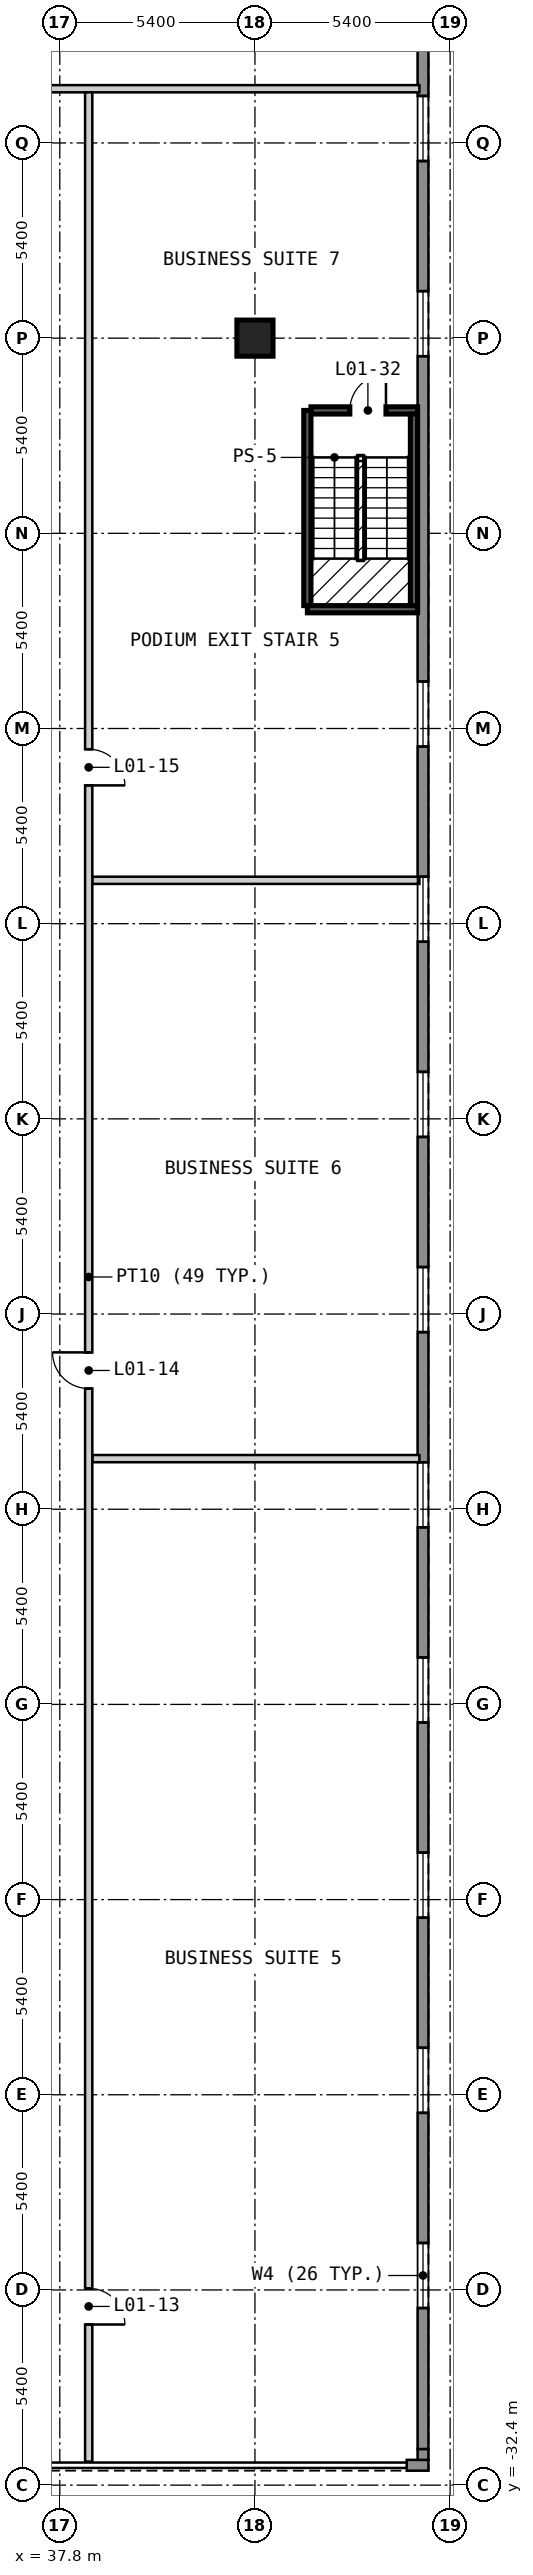
"""IFC4 building model, lengths in metres.
Left out: names, types, materials, properties, quantities, classifications, styles, units other than length and angle.
Written with IfcOpenShell. Run it as: python <this file> out.ifc"""

import sys

from ifc_helpers import new_model, si_unit, direction, frame, frame_2d, origin, origin_2d, place, context, subcontext, project, spatial, rectangle, extrude, element, fill, save


model = new_model("IFC4")
c1 = context("Model", 3, precision=1e-05, world=origin(), true_north=direction((0.0, 1.0)))
c2 = subcontext(c1, "Body", "Model", "MODEL_VIEW")
j1 = project(units=[si_unit("LENGTHUNIT", "METRE"), si_unit("PLANEANGLEUNIT", "RADIAN")], contexts=[c1])
p1 = place(None, origin())
s1 = spatial("IfcSite", under=j1, at=p1, CompositionType="ELEMENT")
p2 = place(p1, origin())
s2 = spatial("IfcBuilding", under=s1, at=p2, CompositionType="ELEMENT")
p3 = place(p2, frame((0.0, 0.0, 5.0)))
s3 = spatial("IfcBuildingStorey", under=s2, at=p3, CompositionType="ELEMENT", Elevation=5.0)
p4 = place(p3, frame((43.2, 27.0, 0.0), z_axis=(0.0, 0.0, 1.0), x_axis=(1.0, 0.0, 0.0)))
e1 = element("IfcColumn", 1, at=p4, inside=s3, PredefinedType="COLUMN", context=c2, shape_type="SweptSolid", body=[
    extrude(rectangle(XDim=1.0, YDim=1.0, at=origin_2d()), origin(), (0.0, 0.0, 1.0), 4.0),
])
p5 = place(p3, frame((47.4, -31.85, 0.0), z_axis=(0.0, 0.0, 1.0), x_axis=(1.0, 0.0, 0.0)))
e2 = element("IfcWall", 2, at=p5, inside=s3, PredefinedType="SOLIDWALL", context=c2, shape_type="SweptSolid", body=[
    extrude(rectangle(XDim=0.6, YDim=0.3, at=frame_2d((0.3, 0.0))), origin(), (0.0, 0.0, 1.0), 3.5),
])
p6 = place(p3, frame((47.85, -31.7, 0.0), z_axis=(0.0, 0.0, 1.0), x_axis=(0.0, 1.0, 0.0)))
e3 = element("IfcWall", 3, at=p6, inside=s3, PredefinedType="SOLIDWALL", context=c2, shape_type="SweptSolid", body=[
    extrude(rectangle(XDim=0.3, YDim=0.3, at=frame_2d((0.15, 0.0))), origin(), (0.0, 0.0, 1.0), 3.5),
])
p7 = place(p3, frame((47.85, -31.4, 0.0), z_axis=(0.0, 0.0, 1.0), x_axis=(0.0, 1.0, 0.0)))
e4 = element("IfcWall", 4, at=p7, inside=s3, PredefinedType="SOLIDWALL", context=c2, shape_type="SweptSolid", body=[
    extrude(rectangle(XDim=70.8, YDim=0.3, at=frame_2d((35.4, 0.0))), origin(), (0.0, 0.0, 1.0), 3.5),
])
p8 = place(p7, frame((3.9, 0.0, 0.9)))
e5 = element("IfcOpeningElement", 5, at=p8, cuts=e4, PredefinedType="OPENING", context=c2, shape_type="SweptSolid", body=[
    extrude(rectangle(XDim=1.8, YDim=2.4, at=frame_2d((0.9, 1.2))), frame((0.0, 0.16, 0.0), z_axis=(0.0, -1.0, 0.0), x_axis=(1.0, 0.0, 0.0)), (0.0, 0.0, 1.0), 0.32),
])
p9 = place(p7, frame((9.3, 0.0, 0.9)))
e6 = element("IfcOpeningElement", 6, at=p9, cuts=e4, PredefinedType="OPENING", context=c2, shape_type="SweptSolid", body=[
    extrude(rectangle(XDim=1.8, YDim=2.4, at=frame_2d((0.9, 1.2))), frame((0.0, 0.16, 0.0), z_axis=(0.0, -1.0, 0.0), x_axis=(1.0, 0.0, 0.0)), (0.0, 0.0, 1.0), 0.32),
])
p10 = place(p7, frame((14.7, 0.0, 0.9)))
e7 = element("IfcOpeningElement", 7, at=p10, cuts=e4, PredefinedType="OPENING", context=c2, shape_type="SweptSolid", body=[
    extrude(rectangle(XDim=1.8, YDim=2.4, at=frame_2d((0.9, 1.2))), frame((0.0, 0.16, 0.0), z_axis=(0.0, -1.0, 0.0), x_axis=(1.0, 0.0, 0.0)), (0.0, 0.0, 1.0), 0.32),
])
p11 = place(p7, frame((20.1, 0.0, 0.9)))
e8 = element("IfcOpeningElement", 8, at=p11, cuts=e4, PredefinedType="OPENING", context=c2, shape_type="SweptSolid", body=[
    extrude(rectangle(XDim=1.8, YDim=2.4, at=frame_2d((0.9, 1.2))), frame((0.0, 0.16, 0.0), z_axis=(0.0, -1.0, 0.0), x_axis=(1.0, 0.0, 0.0)), (0.0, 0.0, 1.0), 0.32),
])
p12 = place(p7, frame((25.5, 0.0, 0.9)))
e9 = element("IfcOpeningElement", 9, at=p12, cuts=e4, PredefinedType="OPENING", context=c2, shape_type="SweptSolid", body=[
    extrude(rectangle(XDim=1.8, YDim=2.4, at=frame_2d((0.9, 1.2))), frame((0.0, 0.16, 0.0), z_axis=(0.0, -1.0, 0.0), x_axis=(1.0, 0.0, 0.0)), (0.0, 0.0, 1.0), 0.32),
])
p13 = place(p7, frame((30.9, 0.0, 0.9)))
e10 = element("IfcOpeningElement", 10, at=p13, cuts=e4, PredefinedType="OPENING", context=c2, shape_type="SweptSolid", body=[
    extrude(rectangle(XDim=1.8, YDim=2.4, at=frame_2d((0.9, 1.2))), frame((0.0, 0.16, 0.0), z_axis=(0.0, -1.0, 0.0), x_axis=(1.0, 0.0, 0.0)), (0.0, 0.0, 1.0), 0.32),
])
p14 = place(p7, frame((36.3, 0.0, 0.9)))
e11 = element("IfcOpeningElement", 11, at=p14, cuts=e4, PredefinedType="OPENING", context=c2, shape_type="SweptSolid", body=[
    extrude(rectangle(XDim=1.8, YDim=2.4, at=frame_2d((0.9, 1.2))), frame((0.0, 0.16, 0.0), z_axis=(0.0, -1.0, 0.0), x_axis=(1.0, 0.0, 0.0)), (0.0, 0.0, 1.0), 0.32),
])
p15 = place(p7, frame((41.7, 0.0, 0.9)))
e12 = element("IfcOpeningElement", 12, at=p15, cuts=e4, PredefinedType="OPENING", context=c2, shape_type="SweptSolid", body=[
    extrude(rectangle(XDim=1.8, YDim=2.4, at=frame_2d((0.9, 1.2))), frame((0.0, 0.16, 0.0), z_axis=(0.0, -1.0, 0.0), x_axis=(1.0, 0.0, 0.0)), (0.0, 0.0, 1.0), 0.32),
])
p16 = place(p7, frame((47.1, 0.0, 0.9)))
e13 = element("IfcOpeningElement", 13, at=p16, cuts=e4, PredefinedType="OPENING", context=c2, shape_type="SweptSolid", body=[
    extrude(rectangle(XDim=1.8, YDim=2.4, at=frame_2d((0.9, 1.2))), frame((0.0, 0.16, 0.0), z_axis=(0.0, -1.0, 0.0), x_axis=(1.0, 0.0, 0.0)), (0.0, 0.0, 1.0), 0.32),
])
p17 = place(p7, frame((57.9, 0.0, 0.9)))
e14 = element("IfcOpeningElement", 14, at=p17, cuts=e4, PredefinedType="OPENING", context=c2, shape_type="SweptSolid", body=[
    extrude(rectangle(XDim=1.8, YDim=2.4, at=frame_2d((0.9, 1.2))), frame((0.0, 0.16, 0.0), z_axis=(0.0, -1.0, 0.0), x_axis=(1.0, 0.0, 0.0)), (0.0, 0.0, 1.0), 0.32),
])
p18 = place(p7, frame((63.3, 0.0, 0.9)))
e15 = element("IfcOpeningElement", 15, at=p18, cuts=e4, PredefinedType="OPENING", context=c2, shape_type="SweptSolid", body=[
    extrude(rectangle(XDim=1.8, YDim=2.4, at=frame_2d((0.9, 1.2))), frame((0.0, 0.16, 0.0), z_axis=(0.0, -1.0, 0.0), x_axis=(1.0, 0.0, 0.0)), (0.0, 0.0, 1.0), 0.32),
])
for number, where, z_axis, x_axis in (
    (16, (38.7, -4.0, 0.0), (0.0, 0.0, 1.0), (1.0, 0.0, 0.0)),
    (17, (38.7, 12.0, 0.0), (0.0, 0.0, 1.0), (1.0, 0.0, 0.0)),
):
    element("IfcWall", number, at=place(p3, frame(where, z_axis=z_axis, x_axis=x_axis)), inside=s3, PredefinedType="PARTITIONING", context=c2, shape_type="SweptSolid", body=[
        extrude(rectangle(XDim=9.05, YDim=0.2, at=frame_2d((4.525, 0.0))), origin(), (0.0, 0.0, 1.0), 3.5),
    ])
p19 = place(p3, frame((44.65, 19.5, 0.0), z_axis=(0.0, 0.0, 1.0), x_axis=(1.0, 0.0, 0.0)))
e18 = element("IfcWall", 18, at=p19, inside=s3, PredefinedType="SOLIDWALL", context=c2, shape_type="SweptSolid", body=[
    extrude(rectangle(XDim=3.05, YDim=0.2, at=frame_2d((1.525, 0.0))), origin(), (0.0, 0.0, 1.0), 3.5),
])
p20 = place(p3, frame((44.75, 25.0, 0.0), z_axis=(0.0, 0.0, 1.0), x_axis=(1.0, 0.0, 0.0)))
e19 = element("IfcWall", 19, at=p20, inside=s3, PredefinedType="SOLIDWALL", context=c2, shape_type="SweptSolid", body=[
    extrude(rectangle(XDim=2.95, YDim=0.2, at=frame_2d((1.475, 0.0))), origin(), (0.0, 0.0, 1.0), 3.5),
])
p21 = place(p20, frame((2.075, 0.0, 0.0), z_axis=(0.0, 0.0, 1.0), x_axis=(-1.0, 0.0, 0.0)))
e20 = element("IfcOpeningElement", 20, at=p21, cuts=e19, PredefinedType="OPENING", context=c2, shape_type="SweptSolid", body=[
    extrude(rectangle(XDim=1.0, YDim=2.1, at=frame_2d((0.5, 1.05))), frame((0.0, 0.11, 0.0), z_axis=(0.0, -1.0, 0.0), x_axis=(1.0, 0.0, 0.0)), (0.0, 0.0, 1.0), 0.22),
])
p22 = place(p3, frame((21.2, 33.9, 0.0), z_axis=(0.0, 0.0, 1.0), x_axis=(1.0, 0.0, 0.0)))
e21 = element("IfcWall", 21, at=p22, inside=s3, PredefinedType="PARTITIONING", context=c2, shape_type="SweptSolid", body=[
    extrude(rectangle(XDim=26.55, YDim=0.2, at=frame_2d((13.275, 0.0))), origin(), (0.0, 0.0, 1.0), 3.5),
])
p23 = place(p22, frame((8.419, 0.0, 0.0)))
e22 = element("IfcOpeningElement", 22, at=p23, cuts=e21, PredefinedType="OPENING", context=c2, shape_type="SweptSolid", body=[
    extrude(rectangle(XDim=1.0, YDim=2.1, at=frame_2d((0.5, 1.05))), frame((0.0, 0.11, 0.0), z_axis=(0.0, -1.0, 0.0), x_axis=(1.0, 0.0, 0.0)), (0.0, 0.0, 1.0), 0.22),
])
p24 = place(p3, frame((38.6, -31.75, 0.0), z_axis=(0.0, 0.0, 1.0), x_axis=(0.0, 1.0, 0.0)))
e23 = element("IfcWall", 23, at=p24, inside=s3, PredefinedType="PARTITIONING", context=c2, shape_type="SweptSolid", body=[
    extrude(rectangle(XDim=65.55, YDim=0.2, at=frame_2d((32.775, 0.0))), origin(), (0.0, 0.0, 1.0), 3.5),
])
p25 = place(p24, frame((4.794, 0.0, 0.0), z_axis=(0.0, 0.0, 1.0), x_axis=(-1.0, 0.0, 0.0)))
e24 = element("IfcOpeningElement", 24, at=p25, cuts=e23, PredefinedType="OPENING", context=c2, shape_type="SweptSolid", body=[
    extrude(rectangle(XDim=1.0, YDim=2.1, at=frame_2d((0.5, 1.05))), frame((0.0, 0.11, 0.0), z_axis=(0.0, -1.0, 0.0), x_axis=(1.0, 0.0, 0.0)), (0.0, 0.0, 1.0), 0.22),
])
p26 = place(p24, frame((30.689, 0.0, 0.0), z_axis=(0.0, 0.0, 1.0), x_axis=(-1.0, 0.0, 0.0)))
e25 = element("IfcOpeningElement", 25, at=p26, cuts=e23, PredefinedType="OPENING", context=c2, shape_type="SweptSolid", body=[
    extrude(rectangle(XDim=1.0, YDim=2.1, at=frame_2d((0.5, 1.05))), frame((0.0, 0.11, 0.0), z_axis=(0.0, -1.0, 0.0), x_axis=(1.0, 0.0, 0.0)), (0.0, 0.0, 1.0), 0.22),
])
p27 = place(p24, frame((47.376, 0.0, 0.0), z_axis=(0.0, 0.0, 1.0), x_axis=(-1.0, 0.0, 0.0)))
e26 = element("IfcOpeningElement", 26, at=p27, cuts=e23, PredefinedType="OPENING", context=c2, shape_type="SweptSolid", body=[
    extrude(rectangle(XDim=1.0, YDim=2.1, at=frame_2d((0.5, 1.05))), frame((0.0, 0.11, 0.0), z_axis=(0.0, -1.0, 0.0), x_axis=(1.0, 0.0, 0.0)), (0.0, 0.0, 1.0), 0.22),
])
p28 = place(p3, frame((44.65, 19.6, 0.0), z_axis=(0.0, 0.0, 1.0), x_axis=(0.0, 1.0, 0.0)))
e27 = element("IfcWall", 27, at=p28, inside=s3, PredefinedType="SOLIDWALL", context=c2, shape_type="SweptSolid", body=[
    extrude(rectangle(XDim=5.4, YDim=0.2, at=frame_2d((2.7, 0.0))), origin(), (0.0, 0.0, 1.0), 3.5),
])
p29 = place(p3, frame((47.6, 19.6, 0.0), z_axis=(0.0, 0.0, 1.0), x_axis=(0.0, 1.0, 0.0)))
e28 = element("IfcWall", 28, at=p29, inside=s3, PredefinedType="SOLIDWALL", context=c2, shape_type="SweptSolid", body=[
    extrude(rectangle(XDim=5.3, YDim=0.2, at=frame_2d((2.65, 0.0))), origin(), (0.0, 0.0, 1.0), 3.5),
])
p30 = place(p8, origin())
e29 = element("IfcWindow", 29, at=p30, inside=s3, PartitioningType="SINGLE_PANEL", PredefinedType="WINDOW", context=c2, shape_type="SweptSolid", body=[
    extrude(rectangle(XDim=1.8, YDim=2.4, at=frame_2d((0.9, 1.2))), frame((0.0, 0.03, 0.0), z_axis=(0.0, -1.0, 0.0), x_axis=(1.0, 0.0, 0.0)), (0.0, 0.0, 1.0), 0.06),
])
fill(e5, e29)
p31 = place(p9, origin())
e30 = element("IfcWindow", 30, at=p31, inside=s3, PartitioningType="SINGLE_PANEL", PredefinedType="WINDOW", context=c2, shape_type="SweptSolid", body=[
    extrude(rectangle(XDim=1.8, YDim=2.4, at=frame_2d((0.9, 1.2))), frame((0.0, 0.03, 0.0), z_axis=(0.0, -1.0, 0.0), x_axis=(1.0, 0.0, 0.0)), (0.0, 0.0, 1.0), 0.06),
])
fill(e6, e30)
p32 = place(p10, origin())
e31 = element("IfcWindow", 31, at=p32, inside=s3, PartitioningType="SINGLE_PANEL", PredefinedType="WINDOW", context=c2, shape_type="SweptSolid", body=[
    extrude(rectangle(XDim=1.8, YDim=2.4, at=frame_2d((0.9, 1.2))), frame((0.0, 0.03, 0.0), z_axis=(0.0, -1.0, 0.0), x_axis=(1.0, 0.0, 0.0)), (0.0, 0.0, 1.0), 0.06),
])
fill(e7, e31)
p33 = place(p11, origin())
e32 = element("IfcWindow", 32, at=p33, inside=s3, PartitioningType="SINGLE_PANEL", PredefinedType="WINDOW", context=c2, shape_type="SweptSolid", body=[
    extrude(rectangle(XDim=1.8, YDim=2.4, at=frame_2d((0.9, 1.2))), frame((0.0, 0.03, 0.0), z_axis=(0.0, -1.0, 0.0), x_axis=(1.0, 0.0, 0.0)), (0.0, 0.0, 1.0), 0.06),
])
fill(e8, e32)
p34 = place(p12, origin())
e33 = element("IfcWindow", 33, at=p34, inside=s3, PartitioningType="SINGLE_PANEL", PredefinedType="WINDOW", context=c2, shape_type="SweptSolid", body=[
    extrude(rectangle(XDim=1.8, YDim=2.4, at=frame_2d((0.9, 1.2))), frame((0.0, 0.03, 0.0), z_axis=(0.0, -1.0, 0.0), x_axis=(1.0, 0.0, 0.0)), (0.0, 0.0, 1.0), 0.06),
])
fill(e9, e33)
p35 = place(p13, origin())
e34 = element("IfcWindow", 34, at=p35, inside=s3, PartitioningType="SINGLE_PANEL", PredefinedType="WINDOW", context=c2, shape_type="SweptSolid", body=[
    extrude(rectangle(XDim=1.8, YDim=2.4, at=frame_2d((0.9, 1.2))), frame((0.0, 0.03, 0.0), z_axis=(0.0, -1.0, 0.0), x_axis=(1.0, 0.0, 0.0)), (0.0, 0.0, 1.0), 0.06),
])
fill(e10, e34)
p36 = place(p14, origin())
e35 = element("IfcWindow", 35, at=p36, inside=s3, PartitioningType="SINGLE_PANEL", PredefinedType="WINDOW", context=c2, shape_type="SweptSolid", body=[
    extrude(rectangle(XDim=1.8, YDim=2.4, at=frame_2d((0.9, 1.2))), frame((0.0, 0.03, 0.0), z_axis=(0.0, -1.0, 0.0), x_axis=(1.0, 0.0, 0.0)), (0.0, 0.0, 1.0), 0.06),
])
fill(e11, e35)
p37 = place(p15, origin())
e36 = element("IfcWindow", 36, at=p37, inside=s3, PartitioningType="SINGLE_PANEL", PredefinedType="WINDOW", context=c2, shape_type="SweptSolid", body=[
    extrude(rectangle(XDim=1.8, YDim=2.4, at=frame_2d((0.9, 1.2))), frame((0.0, 0.03, 0.0), z_axis=(0.0, -1.0, 0.0), x_axis=(1.0, 0.0, 0.0)), (0.0, 0.0, 1.0), 0.06),
])
fill(e12, e36)
p38 = place(p16, origin())
e37 = element("IfcWindow", 37, at=p38, inside=s3, PartitioningType="SINGLE_PANEL", PredefinedType="WINDOW", context=c2, shape_type="SweptSolid", body=[
    extrude(rectangle(XDim=1.8, YDim=2.4, at=frame_2d((0.9, 1.2))), frame((0.0, 0.03, 0.0), z_axis=(0.0, -1.0, 0.0), x_axis=(1.0, 0.0, 0.0)), (0.0, 0.0, 1.0), 0.06),
])
fill(e13, e37)
p39 = place(p17, origin())
e38 = element("IfcWindow", 38, at=p39, inside=s3, PartitioningType="SINGLE_PANEL", PredefinedType="WINDOW", context=c2, shape_type="SweptSolid", body=[
    extrude(rectangle(XDim=1.8, YDim=2.4, at=frame_2d((0.9, 1.2))), frame((0.0, 0.03, 0.0), z_axis=(0.0, -1.0, 0.0), x_axis=(1.0, 0.0, 0.0)), (0.0, 0.0, 1.0), 0.06),
])
fill(e14, e38)
p40 = place(p18, origin())
e39 = element("IfcWindow", 39, at=p40, inside=s3, PartitioningType="SINGLE_PANEL", PredefinedType="WINDOW", context=c2, shape_type="SweptSolid", body=[
    extrude(rectangle(XDim=1.8, YDim=2.4, at=frame_2d((0.9, 1.2))), frame((0.0, 0.03, 0.0), z_axis=(0.0, -1.0, 0.0), x_axis=(1.0, 0.0, 0.0)), (0.0, 0.0, 1.0), 0.06),
])
fill(e15, e39)
p41 = place(p25, origin())
e40 = element("IfcDoor", 40, at=p41, inside=s3, OperationType="SINGLE_SWING_RIGHT", PredefinedType="DOOR", context=c2, shape_type="SweptSolid", body=[
    extrude(rectangle(XDim=1.0, YDim=2.1, at=frame_2d((0.5, 1.05))), frame((0.0, 0.025, 0.0), z_axis=(0.0, -1.0, 0.0), x_axis=(1.0, 0.0, 0.0)), (0.0, 0.0, 1.0), 0.05),
])
fill(e24, e40)
p42 = place(p26, origin())
e41 = element("IfcDoor", 41, at=p42, inside=s3, OperationType="SINGLE_SWING_LEFT", PredefinedType="DOOR", context=c2, shape_type="SweptSolid", body=[
    extrude(rectangle(XDim=1.0, YDim=2.1, at=frame_2d((0.5, 1.05))), frame((0.0, 0.025, 0.0), z_axis=(0.0, -1.0, 0.0), x_axis=(1.0, 0.0, 0.0)), (0.0, 0.0, 1.0), 0.05),
])
fill(e25, e41)
p43 = place(p27, origin())
e42 = element("IfcDoor", 42, at=p43, inside=s3, OperationType="SINGLE_SWING_RIGHT", PredefinedType="DOOR", context=c2, shape_type="SweptSolid", body=[
    extrude(rectangle(XDim=1.0, YDim=2.1, at=frame_2d((0.5, 1.05))), frame((0.0, 0.025, 0.0), z_axis=(0.0, -1.0, 0.0), x_axis=(1.0, 0.0, 0.0)), (0.0, 0.0, 1.0), 0.05),
])
fill(e26, e42)
p44 = place(p21, origin())
e43 = element("IfcDoor", 43, at=p44, inside=s3, OperationType="SINGLE_SWING_LEFT", PredefinedType="DOOR", context=c2, shape_type="SweptSolid", body=[
    extrude(rectangle(XDim=1.0, YDim=2.1, at=frame_2d((0.5, 1.05))), frame((0.0, 0.025, 0.0), z_axis=(0.0, -1.0, 0.0), x_axis=(1.0, 0.0, 0.0)), (0.0, 0.0, 1.0), 0.05),
])
fill(e20, e43)
save(model, sys.argv[1])
